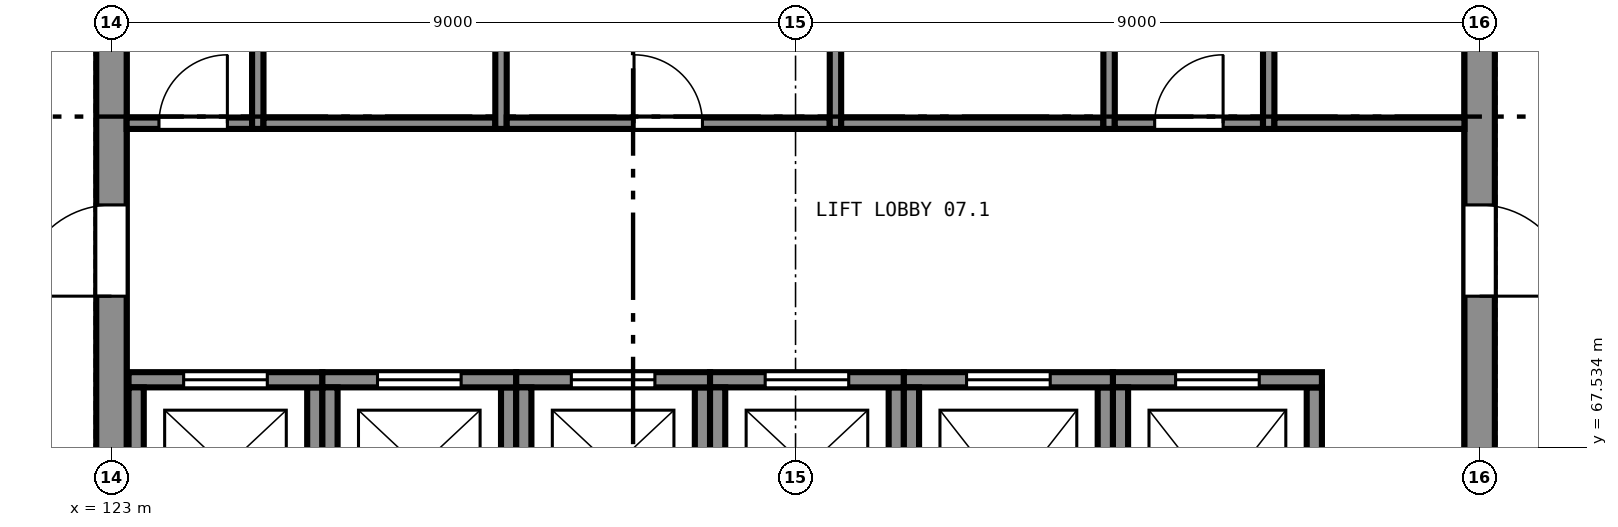
"""IFC4 building model, lengths in metres.
Left out: names, types, materials, properties, quantities, classifications, styles, units other than length and angle.
Written with IfcOpenShell. Run it as: python <this file> out.ifc"""

import sys

from ifc_helpers import new_model, si_unit, direction, frame, frame_2d, origin, place, context, subcontext, project, spatial, rectangle, extrude, element, fill, save


model = new_model("IFC4")
c1 = context("Model", 3, precision=1e-05, world=origin(), true_north=direction((0.0, 1.0)))
c2 = subcontext(c1, "Body", "Model", "MODEL_VIEW")
j1 = project(units=[si_unit("LENGTHUNIT", "METRE"), si_unit("PLANEANGLEUNIT", "RADIAN")], contexts=[c1])
p1 = place(None, origin())
s1 = spatial("IfcSite", under=j1, at=p1, CompositionType="ELEMENT")
p2 = place(p1, origin())
s2 = spatial("IfcBuilding", under=s1, at=p2, CompositionType="ELEMENT")
p3 = place(p2, frame((0.0, 0.0, 29.5)))
s3 = spatial("IfcBuildingStorey", under=s2, at=p3, CompositionType="ELEMENT", Elevation=29.5)
p4 = place(p3, frame((141.0, 65.2, 0.0), z_axis=(0.0, 0.0, 1.0), x_axis=(0.0, 1.0, 0.0)))
e1 = element("IfcWall", 1, at=p4, inside=s3, PredefinedType="SHEAR", context=c2, shape_type="SweptSolid", body=[
    extrude(rectangle(XDim=17.6, YDim=0.4, at=frame_2d((8.8, 0.0))), origin(), (0.0, 0.0, 1.0), 4.0),
])
p5 = place(p4, frame((4.325, 0.0, 0.0)))
e2 = element("IfcOpeningElement", 2, at=p5, cuts=e1, PredefinedType="OPENING", context=c2, shape_type="SweptSolid", body=[
    extrude(rectangle(XDim=1.2, YDim=2.1, at=frame_2d((0.6, 1.05))), frame((0.0, 0.21, 0.0), z_axis=(0.0, -1.0, 0.0), x_axis=(1.0, 0.0, 0.0)), (0.0, 0.0, 1.0), 0.42),
])
p6 = place(p4, frame((12.075, 0.0, 0.0)))
e3 = element("IfcOpeningElement", 3, at=p6, cuts=e1, PredefinedType="OPENING", context=c2, shape_type="SweptSolid", body=[
    extrude(rectangle(XDim=1.2, YDim=2.1, at=frame_2d((0.6, 1.05))), frame((0.0, 0.21, 0.0), z_axis=(0.0, -1.0, 0.0), x_axis=(1.0, 0.0, 0.0)), (0.0, 0.0, 1.0), 0.42),
])
p7 = place(p3, frame((123.0, 82.8, 0.0), z_axis=(0.0, 0.0, 1.0), x_axis=(0.0, -1.0, 0.0)))
e4 = element("IfcWall", 4, at=p7, inside=s3, PredefinedType="SHEAR", context=c2, shape_type="SweptSolid", body=[
    extrude(rectangle(XDim=17.6, YDim=0.4, at=frame_2d((8.8, 0.0))), origin(), (0.0, 0.0, 1.0), 4.0),
])
p8 = place(p7, frame((12.075, 0.0, 0.0)))
e5 = element("IfcOpeningElement", 5, at=p8, cuts=e4, PredefinedType="OPENING", context=c2, shape_type="SweptSolid", body=[
    extrude(rectangle(XDim=1.2, YDim=2.1, at=frame_2d((0.6, 1.05))), frame((0.0, 0.21, 0.0), z_axis=(0.0, -1.0, 0.0), x_axis=(1.0, 0.0, 0.0)), (0.0, 0.0, 1.0), 0.42),
])
p9 = place(p7, frame((4.325, 0.0, 0.0)))
e6 = element("IfcOpeningElement", 6, at=p9, cuts=e4, PredefinedType="OPENING", context=c2, shape_type="SweptSolid", body=[
    extrude(rectangle(XDim=1.2, YDim=2.1, at=frame_2d((0.6, 1.05))), frame((0.0, 0.21, 0.0), z_axis=(0.0, -1.0, 0.0), x_axis=(1.0, 0.0, 0.0)), (0.0, 0.0, 1.0), 0.42),
])
p10 = place(p3, frame((125.675, 66.225, 0.0), z_axis=(0.0, 0.0, 1.0), x_axis=(0.0, 1.0, 0.0)))
e7 = element("IfcWall", 7, at=p10, inside=s3, PredefinedType="SHEAR", context=c2, shape_type="SweptSolid", body=[
    extrude(rectangle(XDim=2.1, YDim=0.2, at=frame_2d((1.05, 0.0))), origin(), (0.0, 0.0, 1.0), 4.0),
])
p11 = place(p3, frame((125.775, 68.425, 0.0), z_axis=(0.0, 0.0, 1.0), x_axis=(-1.0, 0.0, 0.0)))
e8 = element("IfcWall", 8, at=p11, inside=s3, PredefinedType="SHEAR", context=c2, shape_type="SweptSolid", body=[
    extrude(rectangle(XDim=2.55, YDim=0.2, at=frame_2d((1.275, 0.0))), origin(), (0.0, 0.0, 1.0), 4.0),
])
p12 = place(p11, frame((0.725, 0.0, 0.0)))
e9 = element("IfcOpeningElement", 9, at=p12, cuts=e8, PredefinedType="OPENING", context=c2, shape_type="SweptSolid", body=[
    extrude(rectangle(XDim=1.1, YDim=2.1, at=frame_2d((0.55, 1.05))), frame((0.0, 0.11, 0.0), z_axis=(0.0, -1.0, 0.0), x_axis=(1.0, 0.0, 0.0)), (0.0, 0.0, 1.0), 0.22),
])
for number, where, z_axis, x_axis in (
    (10, (123.325, 68.325, 0.0), (0.0, 0.0, 1.0), (0.0, -1.0, 0.0)),
    (11, (128.225, 66.225, 0.0), (0.0, 0.0, 1.0), (0.0, 1.0, 0.0)),
):
    element("IfcWall", number, at=place(p3, frame(where, z_axis=z_axis, x_axis=x_axis)), inside=s3, PredefinedType="SHEAR", context=c2, shape_type="SweptSolid", body=[
        extrude(rectangle(XDim=2.1, YDim=0.2, at=frame_2d((1.05, 0.0))), origin(), (0.0, 0.0, 1.0), 4.0),
    ])
p13 = place(p3, frame((128.325, 68.425, 0.0), z_axis=(0.0, 0.0, 1.0), x_axis=(-1.0, 0.0, 0.0)))
e12 = element("IfcWall", 12, at=p13, inside=s3, PredefinedType="SHEAR", context=c2, shape_type="SweptSolid", body=[
    extrude(rectangle(XDim=2.55, YDim=0.2, at=frame_2d((1.275, 0.0))), origin(), (0.0, 0.0, 1.0), 4.0),
])
p14 = place(p13, frame((0.725, 0.0, 0.0)))
e13 = element("IfcOpeningElement", 13, at=p14, cuts=e12, PredefinedType="OPENING", context=c2, shape_type="SweptSolid", body=[
    extrude(rectangle(XDim=1.1, YDim=2.1, at=frame_2d((0.55, 1.05))), frame((0.0, 0.11, 0.0), z_axis=(0.0, -1.0, 0.0), x_axis=(1.0, 0.0, 0.0)), (0.0, 0.0, 1.0), 0.22),
])
for number, where, z_axis, x_axis in (
    (14, (125.875, 68.325, 0.0), (0.0, 0.0, 1.0), (0.0, -1.0, 0.0)),
    (15, (130.775, 66.225, 0.0), (0.0, 0.0, 1.0), (0.0, 1.0, 0.0)),
):
    element("IfcWall", number, at=place(p3, frame(where, z_axis=z_axis, x_axis=x_axis)), inside=s3, PredefinedType="SHEAR", context=c2, shape_type="SweptSolid", body=[
        extrude(rectangle(XDim=2.1, YDim=0.2, at=frame_2d((1.05, 0.0))), origin(), (0.0, 0.0, 1.0), 4.0),
    ])
p15 = place(p3, frame((130.875, 68.425, 0.0), z_axis=(0.0, 0.0, 1.0), x_axis=(-1.0, 0.0, 0.0)))
e16 = element("IfcWall", 16, at=p15, inside=s3, PredefinedType="SHEAR", context=c2, shape_type="SweptSolid", body=[
    extrude(rectangle(XDim=2.55, YDim=0.2, at=frame_2d((1.275, 0.0))), origin(), (0.0, 0.0, 1.0), 4.0),
])
p16 = place(p15, frame((0.725, 0.0, 0.0)))
e17 = element("IfcOpeningElement", 17, at=p16, cuts=e16, PredefinedType="OPENING", context=c2, shape_type="SweptSolid", body=[
    extrude(rectangle(XDim=1.1, YDim=2.1, at=frame_2d((0.55, 1.05))), frame((0.0, 0.11, 0.0), z_axis=(0.0, -1.0, 0.0), x_axis=(1.0, 0.0, 0.0)), (0.0, 0.0, 1.0), 0.22),
])
for number, where, z_axis, x_axis in (
    (18, (128.425, 68.325, 0.0), (0.0, 0.0, 1.0), (0.0, -1.0, 0.0)),
    (19, (133.325, 66.225, 0.0), (0.0, 0.0, 1.0), (0.0, 1.0, 0.0)),
):
    element("IfcWall", number, at=place(p3, frame(where, z_axis=z_axis, x_axis=x_axis)), inside=s3, PredefinedType="SHEAR", context=c2, shape_type="SweptSolid", body=[
        extrude(rectangle(XDim=2.1, YDim=0.2, at=frame_2d((1.05, 0.0))), origin(), (0.0, 0.0, 1.0), 4.0),
    ])
p17 = place(p3, frame((133.425, 68.425, 0.0), z_axis=(0.0, 0.0, 1.0), x_axis=(-1.0, 0.0, 0.0)))
e20 = element("IfcWall", 20, at=p17, inside=s3, PredefinedType="SHEAR", context=c2, shape_type="SweptSolid", body=[
    extrude(rectangle(XDim=2.55, YDim=0.2, at=frame_2d((1.275, 0.0))), origin(), (0.0, 0.0, 1.0), 4.0),
])
p18 = place(p17, frame((0.725, 0.0, 0.0)))
e21 = element("IfcOpeningElement", 21, at=p18, cuts=e20, PredefinedType="OPENING", context=c2, shape_type="SweptSolid", body=[
    extrude(rectangle(XDim=1.1, YDim=2.1, at=frame_2d((0.55, 1.05))), frame((0.0, 0.11, 0.0), z_axis=(0.0, -1.0, 0.0), x_axis=(1.0, 0.0, 0.0)), (0.0, 0.0, 1.0), 0.22),
])
p19 = place(p3, frame((130.975, 68.325, 0.0), z_axis=(0.0, 0.0, 1.0), x_axis=(0.0, -1.0, 0.0)))
e22 = element("IfcWall", 22, at=p19, inside=s3, PredefinedType="SHEAR", context=c2, shape_type="SweptSolid", body=[
    extrude(rectangle(XDim=2.1, YDim=0.2, at=frame_2d((1.05, 0.0))), origin(), (0.0, 0.0, 1.0), 4.0),
])
p20 = place(p3, frame((136.075, 65.425, 0.0), z_axis=(0.0, 0.0, 1.0), x_axis=(0.0, 1.0, 0.0)))
e23 = element("IfcWall", 23, at=p20, inside=s3, PredefinedType="SHEAR", context=c2, shape_type="SweptSolid", body=[
    extrude(rectangle(XDim=2.9, YDim=0.2, at=frame_2d((1.45, 0.0))), origin(), (0.0, 0.0, 1.0), 4.0),
])
p21 = place(p3, frame((136.175, 68.425, 0.0), z_axis=(0.0, 0.0, 1.0), x_axis=(-1.0, 0.0, 0.0)))
e24 = element("IfcWall", 24, at=p21, inside=s3, PredefinedType="SHEAR", context=c2, shape_type="SweptSolid", body=[
    extrude(rectangle(XDim=2.75, YDim=0.2, at=frame_2d((1.375, 0.0))), origin(), (0.0, 0.0, 1.0), 4.0),
])
p22 = place(p21, frame((0.825, 0.0, 0.0)))
e25 = element("IfcOpeningElement", 25, at=p22, cuts=e24, PredefinedType="OPENING", context=c2, shape_type="SweptSolid", body=[
    extrude(rectangle(XDim=1.1, YDim=2.1, at=frame_2d((0.55, 1.05))), frame((0.0, 0.11, 0.0), z_axis=(0.0, -1.0, 0.0), x_axis=(1.0, 0.0, 0.0)), (0.0, 0.0, 1.0), 0.22),
])
for number, where, z_axis, x_axis in (
    (26, (133.525, 68.325, 0.0), (0.0, 0.0, 1.0), (0.0, -1.0, 0.0)),
    (27, (138.825, 65.425, 0.0), (0.0, 0.0, 1.0), (0.0, 1.0, 0.0)),
):
    element("IfcWall", number, at=place(p3, frame(where, z_axis=z_axis, x_axis=x_axis)), inside=s3, PredefinedType="SHEAR", context=c2, shape_type="SweptSolid", body=[
        extrude(rectangle(XDim=2.9, YDim=0.2, at=frame_2d((1.45, 0.0))), origin(), (0.0, 0.0, 1.0), 4.0),
    ])
p23 = place(p3, frame((138.925, 68.425, 0.0), z_axis=(0.0, 0.0, 1.0), x_axis=(-1.0, 0.0, 0.0)))
e28 = element("IfcWall", 28, at=p23, inside=s3, PredefinedType="SHEAR", context=c2, shape_type="SweptSolid", body=[
    extrude(rectangle(XDim=2.75, YDim=0.2, at=frame_2d((1.375, 0.0))), origin(), (0.0, 0.0, 1.0), 4.0),
])
p24 = place(p23, frame((0.825, 0.0, 0.0)))
e29 = element("IfcOpeningElement", 29, at=p24, cuts=e28, PredefinedType="OPENING", context=c2, shape_type="SweptSolid", body=[
    extrude(rectangle(XDim=1.1, YDim=2.1, at=frame_2d((0.55, 1.05))), frame((0.0, 0.11, 0.0), z_axis=(0.0, -1.0, 0.0), x_axis=(1.0, 0.0, 0.0)), (0.0, 0.0, 1.0), 0.22),
])
p25 = place(p3, frame((136.275, 68.325, 0.0), z_axis=(0.0, 0.0, 1.0), x_axis=(0.0, -1.0, 0.0)))
e30 = element("IfcWall", 30, at=p25, inside=s3, PredefinedType="SHEAR", context=c2, shape_type="SweptSolid", body=[
    extrude(rectangle(XDim=2.9, YDim=0.2, at=frame_2d((1.45, 0.0))), origin(), (0.0, 0.0, 1.0), 4.0),
])
p26 = place(p3, frame((124.925, 71.725, 0.0), z_axis=(0.0, 0.0, 1.0), x_axis=(0.0, 1.0, 0.0)))
e31 = element("IfcWall", 31, at=p26, inside=s3, PredefinedType="PARTITIONING", context=c2, shape_type="SweptSolid", body=[
    extrude(rectangle(XDim=4.55, YDim=0.15, at=frame_2d((2.275, 0.0))), origin(), (0.0, 0.0, 1.0), 3.75),
])
p27 = place(p3, frame((123.2, 71.8, 0.0), z_axis=(0.0, 0.0, 1.0), x_axis=(1.0, 0.0, 0.0)))
e32 = element("IfcWall", 32, at=p27, inside=s3, PredefinedType="PARTITIONING", context=c2, shape_type="SweptSolid", body=[
    extrude(rectangle(XDim=1.65, YDim=0.15, at=frame_2d((0.825, 0.0))), origin(), (0.0, 0.0, 1.0), 3.75),
])
p28 = place(p27, frame((0.425, 0.0, 0.0)))
e33 = element("IfcOpeningElement", 33, at=p28, cuts=e32, PredefinedType="OPENING", context=c2, shape_type="SweptSolid", body=[
    extrude(rectangle(XDim=0.9, YDim=2.1, at=frame_2d((0.45, 1.05))), frame((0.0, 0.085, 0.0), z_axis=(0.0, -1.0, 0.0), x_axis=(1.0, 0.0, 0.0)), (0.0, 0.0, 1.0), 0.17),
])
p29 = place(p3, frame((128.125, 71.725, 0.0), z_axis=(0.0, 0.0, 1.0), x_axis=(0.0, 1.0, 0.0)))
e34 = element("IfcWall", 34, at=p29, inside=s3, PredefinedType="PARTITIONING", context=c2, shape_type="SweptSolid", body=[
    extrude(rectangle(XDim=4.55, YDim=0.15, at=frame_2d((2.275, 0.0))), origin(), (0.0, 0.0, 1.0), 3.75),
])
p30 = place(p3, frame((125.0, 71.8, 0.0), z_axis=(0.0, 0.0, 1.0), x_axis=(1.0, 0.0, 0.0)))
e35 = element("IfcWall", 35, at=p30, inside=s3, PredefinedType="PARTITIONING", context=c2, shape_type="SweptSolid", body=[
    extrude(rectangle(XDim=3.05, YDim=0.15, at=frame_2d((1.525, 0.0))), origin(), (0.0, 0.0, 1.0), 3.75),
])
p31 = place(p3, frame((132.525, 71.725, 0.0), z_axis=(0.0, 0.0, 1.0), x_axis=(0.0, 1.0, 0.0)))
e36 = element("IfcWall", 36, at=p31, inside=s3, PredefinedType="PARTITIONING", context=c2, shape_type="SweptSolid", body=[
    extrude(rectangle(XDim=4.55, YDim=0.15, at=frame_2d((2.275, 0.0))), origin(), (0.0, 0.0, 1.0), 3.75),
])
p32 = place(p3, frame((128.2, 71.8, 0.0), z_axis=(0.0, 0.0, 1.0), x_axis=(1.0, 0.0, 0.0)))
e37 = element("IfcWall", 37, at=p32, inside=s3, PredefinedType="PARTITIONING", context=c2, shape_type="SweptSolid", body=[
    extrude(rectangle(XDim=4.25, YDim=0.15, at=frame_2d((2.125, 0.0))), origin(), (0.0, 0.0, 1.0), 3.75),
])
p33 = place(p32, frame((1.675, 0.0, 0.0)))
e38 = element("IfcOpeningElement", 38, at=p33, cuts=e37, PredefinedType="OPENING", context=c2, shape_type="SweptSolid", body=[
    extrude(rectangle(XDim=0.9, YDim=2.1, at=frame_2d((0.45, 1.05))), frame((0.0, 0.085, 0.0), z_axis=(0.0, -1.0, 0.0), x_axis=(1.0, 0.0, 0.0)), (0.0, 0.0, 1.0), 0.17),
])
p34 = place(p3, frame((136.125, 71.725, 0.0), z_axis=(0.0, 0.0, 1.0), x_axis=(0.0, 1.0, 0.0)))
e39 = element("IfcWall", 39, at=p34, inside=s3, PredefinedType="PARTITIONING", context=c2, shape_type="SweptSolid", body=[
    extrude(rectangle(XDim=4.55, YDim=0.15, at=frame_2d((2.275, 0.0))), origin(), (0.0, 0.0, 1.0), 3.75),
])
p35 = place(p3, frame((132.6, 71.8, 0.0), z_axis=(0.0, 0.0, 1.0), x_axis=(1.0, 0.0, 0.0)))
e40 = element("IfcWall", 40, at=p35, inside=s3, PredefinedType="PARTITIONING", context=c2, shape_type="SweptSolid", body=[
    extrude(rectangle(XDim=3.45, YDim=0.15, at=frame_2d((1.725, 0.0))), origin(), (0.0, 0.0, 1.0), 3.75),
])
p36 = place(p3, frame((138.225, 71.725, 0.0), z_axis=(0.0, 0.0, 1.0), x_axis=(0.0, 1.0, 0.0)))
e41 = element("IfcWall", 41, at=p36, inside=s3, PredefinedType="PARTITIONING", context=c2, shape_type="SweptSolid", body=[
    extrude(rectangle(XDim=4.55, YDim=0.15, at=frame_2d((2.275, 0.0))), origin(), (0.0, 0.0, 1.0), 3.75),
])
p37 = place(p3, frame((136.2, 71.8, 0.0), z_axis=(0.0, 0.0, 1.0), x_axis=(1.0, 0.0, 0.0)))
e42 = element("IfcWall", 42, at=p37, inside=s3, PredefinedType="PARTITIONING", context=c2, shape_type="SweptSolid", body=[
    extrude(rectangle(XDim=1.95, YDim=0.15, at=frame_2d((0.975, 0.0))), origin(), (0.0, 0.0, 1.0), 3.75),
])
p38 = place(p37, frame((0.525, 0.0, 0.0)))
e43 = element("IfcOpeningElement", 43, at=p38, cuts=e42, PredefinedType="OPENING", context=c2, shape_type="SweptSolid", body=[
    extrude(rectangle(XDim=0.9, YDim=2.1, at=frame_2d((0.45, 1.05))), frame((0.0, 0.085, 0.0), z_axis=(0.0, -1.0, 0.0), x_axis=(1.0, 0.0, 0.0)), (0.0, 0.0, 1.0), 0.17),
])
p39 = place(p3, frame((138.3, 71.8, 0.0), z_axis=(0.0, 0.0, 1.0), x_axis=(1.0, 0.0, 0.0)))
e44 = element("IfcWall", 44, at=p39, inside=s3, PredefinedType="PARTITIONING", context=c2, shape_type="SweptSolid", body=[
    extrude(rectangle(XDim=2.5, YDim=0.15, at=frame_2d((1.25, 0.0))), origin(), (0.0, 0.0, 1.0), 3.75),
])
p40 = place(p12, origin())
e45 = element("IfcDoor", 45, at=p40, inside=s3, OperationType="SLIDING_TO_LEFT", PredefinedType="DOOR", context=c2, shape_type="SweptSolid", body=[
    extrude(rectangle(XDim=1.1, YDim=2.1, at=frame_2d((0.55, 1.05))), frame((0.0, 0.025, 0.0), z_axis=(0.0, -1.0, 0.0), x_axis=(1.0, 0.0, 0.0)), (0.0, 0.0, 1.0), 0.05),
])
fill(e9, e45)
p41 = place(p14, origin())
e46 = element("IfcDoor", 46, at=p41, inside=s3, OperationType="SLIDING_TO_LEFT", PredefinedType="DOOR", context=c2, shape_type="SweptSolid", body=[
    extrude(rectangle(XDim=1.1, YDim=2.1, at=frame_2d((0.55, 1.05))), frame((0.0, 0.025, 0.0), z_axis=(0.0, -1.0, 0.0), x_axis=(1.0, 0.0, 0.0)), (0.0, 0.0, 1.0), 0.05),
])
fill(e13, e46)
p42 = place(p16, origin())
e47 = element("IfcDoor", 47, at=p42, inside=s3, OperationType="SLIDING_TO_LEFT", PredefinedType="DOOR", context=c2, shape_type="SweptSolid", body=[
    extrude(rectangle(XDim=1.1, YDim=2.1, at=frame_2d((0.55, 1.05))), frame((0.0, 0.025, 0.0), z_axis=(0.0, -1.0, 0.0), x_axis=(1.0, 0.0, 0.0)), (0.0, 0.0, 1.0), 0.05),
])
fill(e17, e47)
p43 = place(p18, origin())
e48 = element("IfcDoor", 48, at=p43, inside=s3, OperationType="SLIDING_TO_LEFT", PredefinedType="DOOR", context=c2, shape_type="SweptSolid", body=[
    extrude(rectangle(XDim=1.1, YDim=2.1, at=frame_2d((0.55, 1.05))), frame((0.0, 0.025, 0.0), z_axis=(0.0, -1.0, 0.0), x_axis=(1.0, 0.0, 0.0)), (0.0, 0.0, 1.0), 0.05),
])
fill(e21, e48)
p44 = place(p22, origin())
e49 = element("IfcDoor", 49, at=p44, inside=s3, OperationType="SLIDING_TO_LEFT", PredefinedType="DOOR", context=c2, shape_type="SweptSolid", body=[
    extrude(rectangle(XDim=1.1, YDim=2.1, at=frame_2d((0.55, 1.05))), frame((0.0, 0.025, 0.0), z_axis=(0.0, -1.0, 0.0), x_axis=(1.0, 0.0, 0.0)), (0.0, 0.0, 1.0), 0.05),
])
fill(e25, e49)
p45 = place(p24, origin())
e50 = element("IfcDoor", 50, at=p45, inside=s3, OperationType="SLIDING_TO_LEFT", PredefinedType="DOOR", context=c2, shape_type="SweptSolid", body=[
    extrude(rectangle(XDim=1.1, YDim=2.1, at=frame_2d((0.55, 1.05))), frame((0.0, 0.025, 0.0), z_axis=(0.0, -1.0, 0.0), x_axis=(1.0, 0.0, 0.0)), (0.0, 0.0, 1.0), 0.05),
])
fill(e29, e50)
p46 = place(p8, frame((1.2, 0.0, 0.0), z_axis=(0.0, 0.0, 1.0), x_axis=(-1.0, 0.0, 0.0)))
e51 = element("IfcDoor", 51, at=p46, inside=s3, OperationType="SINGLE_SWING_RIGHT", PredefinedType="DOOR", context=c2, shape_type="SweptSolid", body=[
    extrude(rectangle(XDim=1.2, YDim=2.1, at=frame_2d((0.6, 1.05))), frame((0.0, 0.025, 0.0), z_axis=(0.0, -1.0, 0.0), x_axis=(1.0, 0.0, 0.0)), (0.0, 0.0, 1.0), 0.05),
])
fill(e5, e51)
p47 = place(p5, frame((1.2, 0.0, 0.0), z_axis=(0.0, 0.0, 1.0), x_axis=(-1.0, 0.0, 0.0)))
e52 = element("IfcDoor", 52, at=p47, inside=s3, OperationType="SINGLE_SWING_LEFT", PredefinedType="DOOR", context=c2, shape_type="SweptSolid", body=[
    extrude(rectangle(XDim=1.2, YDim=2.1, at=frame_2d((0.6, 1.05))), frame((0.0, 0.025, 0.0), z_axis=(0.0, -1.0, 0.0), x_axis=(1.0, 0.0, 0.0)), (0.0, 0.0, 1.0), 0.05),
])
fill(e2, e52)
p48 = place(p28, origin())
e53 = element("IfcDoor", 53, at=p48, inside=s3, OperationType="SINGLE_SWING_LEFT", PredefinedType="DOOR", context=c2, shape_type="SweptSolid", body=[
    extrude(rectangle(XDim=0.9, YDim=2.1, at=frame_2d((0.45, 1.05))), frame((0.0, 0.025, 0.0), z_axis=(0.0, -1.0, 0.0), x_axis=(1.0, 0.0, 0.0)), (0.0, 0.0, 1.0), 0.05),
])
fill(e33, e53)
p49 = place(p33, origin())
e54 = element("IfcDoor", 54, at=p49, inside=s3, OperationType="SINGLE_SWING_RIGHT", PredefinedType="DOOR", context=c2, shape_type="SweptSolid", body=[
    extrude(rectangle(XDim=0.9, YDim=2.1, at=frame_2d((0.45, 1.05))), frame((0.0, 0.025, 0.0), z_axis=(0.0, -1.0, 0.0), x_axis=(1.0, 0.0, 0.0)), (0.0, 0.0, 1.0), 0.05),
])
fill(e38, e54)
p50 = place(p38, origin())
e55 = element("IfcDoor", 55, at=p50, inside=s3, OperationType="SINGLE_SWING_LEFT", PredefinedType="DOOR", context=c2, shape_type="SweptSolid", body=[
    extrude(rectangle(XDim=0.9, YDim=2.1, at=frame_2d((0.45, 1.05))), frame((0.0, 0.025, 0.0), z_axis=(0.0, -1.0, 0.0), x_axis=(1.0, 0.0, 0.0)), (0.0, 0.0, 1.0), 0.05),
])
fill(e43, e55)
save(model, sys.argv[1])
